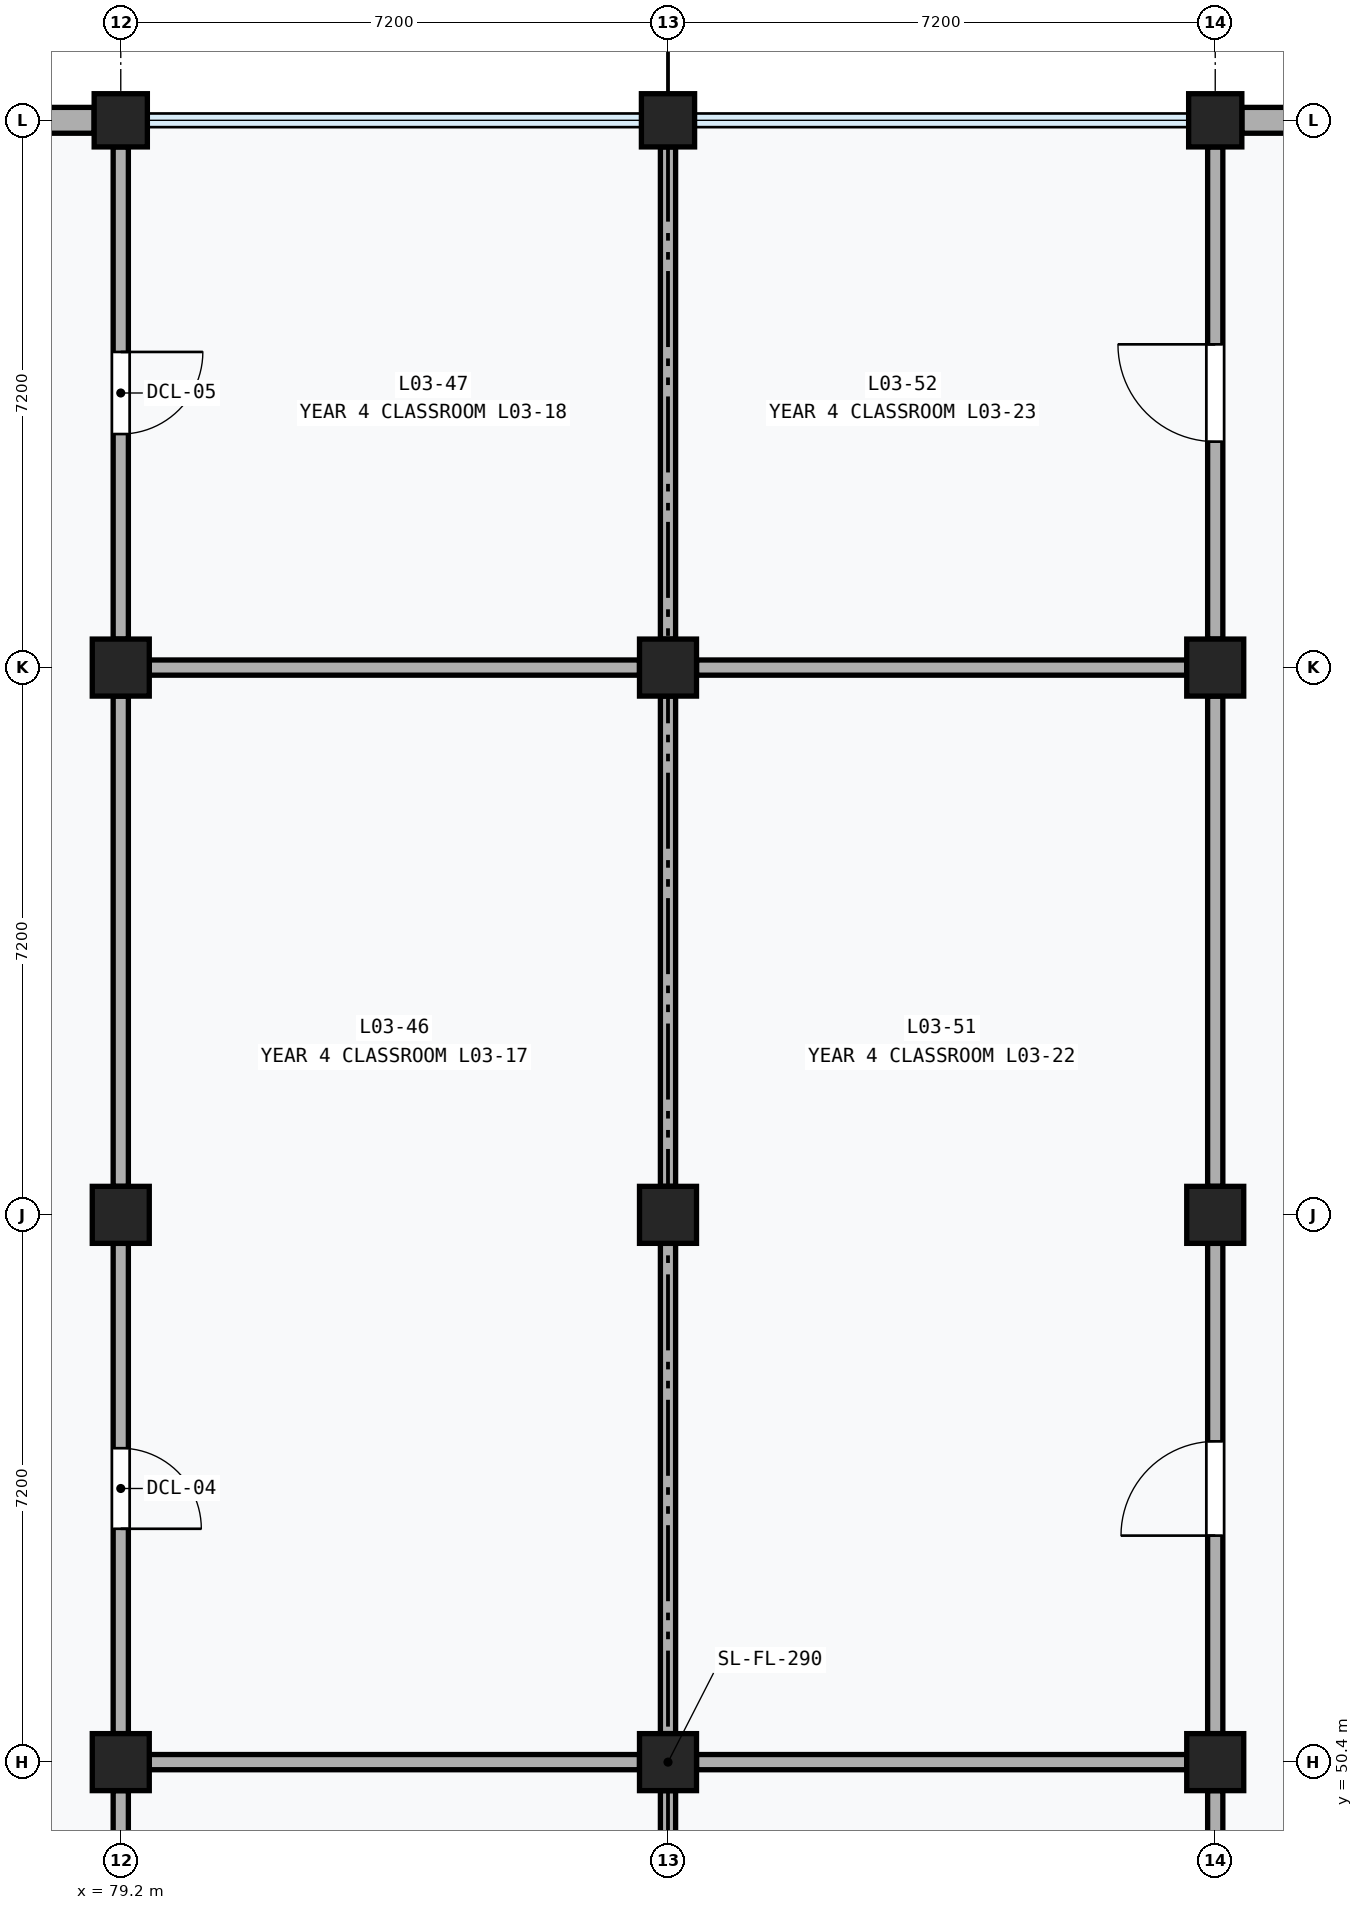
"""IFC4 building model, lengths in metres.
Left out: names, types, materials, properties, quantities, classifications, styles, units other than length and angle.
Written with IfcOpenShell. Run it as: python <this file> out.ifc"""

import sys

from ifc_helpers import new_model, si_unit, direction, frame, frame_2d, origin, origin_2d, place, context, subcontext, project, spatial, rectangle, extrude, element, fill, save


model = new_model("IFC4")
c1 = context("Model", 3, precision=1e-05, world=origin(), true_north=direction((0.0, 1.0)))
c2 = subcontext(c1, "Body", "Model", "MODEL_VIEW")
j1 = project(units=[si_unit("LENGTHUNIT", "METRE"), si_unit("PLANEANGLEUNIT", "RADIAN")], contexts=[c1])
p1 = place(None, origin())
s1 = spatial("IfcSite", under=j1, at=p1, CompositionType="ELEMENT")
p2 = place(p1, origin())
s2 = spatial("IfcBuilding", under=s1, at=p2, CompositionType="ELEMENT")
p3 = place(p2, frame((0.0, 0.0, 14.4)))
s3 = spatial("IfcBuildingStorey", under=s2, at=p3, CompositionType="ELEMENT", Elevation=14.4)
for number, where, z_axis, x_axis in (
    (1, (79.2, 50.4, 0.0), (0.0, 0.0, 1.0), (1.0, 0.0, 0.0)),
    (2, (79.2, 57.6, 0.0), (0.0, 0.0, 1.0), (1.0, 0.0, 0.0)),
    (3, (79.2, 64.8, 0.0), (0.0, 0.0, 1.0), (1.0, 0.0, 0.0)),
):
    element("IfcColumn", number, at=place(p3, frame(where, z_axis=z_axis, x_axis=x_axis)), inside=s3, PredefinedType="COLUMN", context=c2, shape_type="SweptSolid", body=[
        extrude(rectangle(XDim=0.75, YDim=0.75, at=origin_2d()), origin(), (0.0, 0.0, 1.0), 4.2),
    ])
p4 = place(p3, frame((79.2, 72.0, 0.0), z_axis=(0.0, 0.0, 1.0), x_axis=(1.0, 0.0, 0.0)))
e4 = element("IfcColumn", 4, at=p4, inside=s3, PredefinedType="COLUMN", context=c2, shape_type="SweptSolid", body=[
    extrude(rectangle(XDim=0.7, YDim=0.7, at=origin_2d()), origin(), (0.0, 0.0, 1.0), 4.2),
])
for number, where, z_axis, x_axis in (
    (5, (86.4, 50.4, 0.0), (0.0, 0.0, 1.0), (1.0, 0.0, 0.0)),
    (6, (86.4, 57.6, 0.0), (0.0, 0.0, 1.0), (1.0, 0.0, 0.0)),
    (7, (86.4, 64.8, 0.0), (0.0, 0.0, 1.0), (1.0, 0.0, 0.0)),
):
    element("IfcColumn", number, at=place(p3, frame(where, z_axis=z_axis, x_axis=x_axis)), inside=s3, PredefinedType="COLUMN", context=c2, shape_type="SweptSolid", body=[
        extrude(rectangle(XDim=0.75, YDim=0.75, at=origin_2d()), origin(), (0.0, 0.0, 1.0), 4.2),
    ])
p5 = place(p3, frame((86.4, 72.0, 0.0), z_axis=(0.0, 0.0, 1.0), x_axis=(1.0, 0.0, 0.0)))
e8 = element("IfcColumn", 8, at=p5, inside=s3, PredefinedType="COLUMN", context=c2, shape_type="SweptSolid", body=[
    extrude(rectangle(XDim=0.7, YDim=0.7, at=origin_2d()), origin(), (0.0, 0.0, 1.0), 4.2),
])
for number, where, z_axis, x_axis in (
    (9, (93.6, 50.4, 0.0), (0.0, 0.0, 1.0), (1.0, 0.0, 0.0)),
    (10, (93.6, 57.6, 0.0), (0.0, 0.0, 1.0), (1.0, 0.0, 0.0)),
    (11, (93.6, 64.8, 0.0), (0.0, 0.0, 1.0), (1.0, 0.0, 0.0)),
):
    element("IfcColumn", number, at=place(p3, frame(where, z_axis=z_axis, x_axis=x_axis)), inside=s3, PredefinedType="COLUMN", context=c2, shape_type="SweptSolid", body=[
        extrude(rectangle(XDim=0.75, YDim=0.75, at=origin_2d()), origin(), (0.0, 0.0, 1.0), 4.2),
    ])
p6 = place(p3, frame((93.6, 72.0, 0.0), z_axis=(0.0, 0.0, 1.0), x_axis=(1.0, 0.0, 0.0)))
e12 = element("IfcColumn", 12, at=p6, inside=s3, PredefinedType="COLUMN", context=c2, shape_type="SweptSolid", body=[
    extrude(rectangle(XDim=0.7, YDim=0.7, at=origin_2d()), origin(), (0.0, 0.0, 1.0), 4.2),
])
p7 = place(p3, frame((72.25, 72.0, 0.0), z_axis=(0.0, 0.0, 1.0), x_axis=(1.0, 0.0, 0.0)))
e13 = element("IfcWall", 13, at=p7, inside=s3, PredefinedType="SOLIDWALL", context=c2, shape_type="SweptSolid", body=[
    extrude(rectangle(XDim=6.6, YDim=0.34, at=frame_2d((3.3, 0.0))), origin(), (0.0, 0.0, 1.0), 3.31),
])
p8 = place(p7, frame((1.8, 0.0, 0.9)))
e14 = element("IfcOpeningElement", 14, at=p8, cuts=e13, PredefinedType="OPENING", context=c2, shape_type="SweptSolid", body=[
    extrude(rectangle(XDim=3.0, YDim=1.8, at=frame_2d((1.5, 0.9))), frame((0.0, 0.182, 0.0), z_axis=(0.0, -1.0, 0.0), x_axis=(1.0, 0.0, 0.0)), (0.0, 0.0, 1.0), 0.364),
])
p9 = place(p3, frame((93.95, 72.0, 0.0), z_axis=(0.0, 0.0, 1.0), x_axis=(1.0, 0.0, 0.0)))
e15 = element("IfcWall", 15, at=p9, inside=s3, PredefinedType="SOLIDWALL", context=c2, shape_type="SweptSolid", body=[
    extrude(rectangle(XDim=6.5, YDim=0.34, at=frame_2d((3.25, 0.0))), origin(), (0.0, 0.0, 1.0), 3.31),
])
p10 = place(p9, frame((2.35, 0.0, 0.85)))
e16 = element("IfcOpeningElement", 16, at=p10, cuts=e15, PredefinedType="OPENING", context=c2, shape_type="SweptSolid", body=[
    extrude(rectangle(XDim=1.8, YDim=2.0, at=frame_2d((0.9, 1.0))), frame((0.0, 0.182, 0.0), z_axis=(0.0, -1.0, 0.0), x_axis=(1.0, 0.0, 0.0)), (0.0, 0.0, 1.0), 0.364),
])
for number, where, z_axis, x_axis in (
    (17, (79.575, 50.4, 0.0), (0.0, 0.0, 1.0), (1.0, 0.0, 0.0)),
    (18, (79.2, 43.575, 0.0), (0.0, 0.0, 1.0), (0.0, 1.0, 0.0)),
    (19, (86.4, 43.575, 0.0), (0.0, 0.0, 1.0), (0.0, 1.0, 0.0)),
):
    element("IfcWall", number, at=place(p3, frame(where, z_axis=z_axis, x_axis=x_axis)), inside=s3, PredefinedType="PARTITIONING", context=c2, shape_type="SweptSolid", body=[
        extrude(rectangle(XDim=6.45, YDim=0.2, at=frame_2d((3.225, 0.0))), origin(), (0.0, 0.0, 1.0), 3.17),
    ])
p11 = place(p3, frame((79.2, 50.775, 0.0), z_axis=(0.0, 0.0, 1.0), x_axis=(0.0, 1.0, 0.0)))
e20 = element("IfcWall", 20, at=p11, inside=s3, PredefinedType="PARTITIONING", context=c2, shape_type="SweptSolid", body=[
    extrude(rectangle(XDim=6.45, YDim=0.2, at=frame_2d((3.225, 0.0))), origin(), (0.0, 0.0, 1.0), 3.17),
])
p12 = place(p11, frame((2.695, 0.0, 0.0)))
e21 = element("IfcOpeningElement", 21, at=p12, cuts=e20, PredefinedType="OPENING", context=c2, shape_type="SweptSolid", body=[
    extrude(rectangle(XDim=1.06, YDim=2.16, at=frame_2d((0.53, 1.08))), frame((0.0, 0.112, 0.0), z_axis=(0.0, -1.0, 0.0), x_axis=(1.0, 0.0, 0.0)), (0.0, 0.0, 1.0), 0.224),
])
p13 = place(p3, frame((86.4, 50.775, 0.0), z_axis=(0.0, 0.0, 1.0), x_axis=(0.0, 1.0, 0.0)))
e22 = element("IfcWall", 22, at=p13, inside=s3, PredefinedType="PARTITIONING", context=c2, shape_type="SweptSolid", body=[
    extrude(rectangle(XDim=6.45, YDim=0.2, at=frame_2d((3.225, 0.0))), origin(), (0.0, 0.0, 1.0), 3.17),
])
p14 = place(p3, frame((79.575, 64.8, 0.0), z_axis=(0.0, 0.0, 1.0), x_axis=(1.0, 0.0, 0.0)))
e23 = element("IfcWall", 23, at=p14, inside=s3, PredefinedType="PARTITIONING", context=c2, shape_type="SweptSolid", body=[
    extrude(rectangle(XDim=6.45, YDim=0.2, at=frame_2d((3.225, 0.0))), origin(), (0.0, 0.0, 1.0), 3.24),
])
for number, where, z_axis, x_axis in (
    (24, (79.2, 57.975, 0.0), (0.0, 0.0, 1.0), (0.0, 1.0, 0.0)),
    (25, (86.4, 57.975, 0.0), (0.0, 0.0, 1.0), (0.0, 1.0, 0.0)),
):
    element("IfcWall", number, at=place(p3, frame(where, z_axis=z_axis, x_axis=x_axis)), inside=s3, PredefinedType="PARTITIONING", context=c2, shape_type="SweptSolid", body=[
        extrude(rectangle(XDim=6.45, YDim=0.2, at=frame_2d((3.225, 0.0))), origin(), (0.0, 0.0, 1.0), 3.17),
    ])
p15 = place(p3, frame((79.2, 65.175, 0.0), z_axis=(0.0, 0.0, 1.0), x_axis=(0.0, 1.0, 0.0)))
e26 = element("IfcWall", 26, at=p15, inside=s3, PredefinedType="PARTITIONING", context=c2, shape_type="SweptSolid", body=[
    extrude(rectangle(XDim=6.475, YDim=0.2, at=frame_2d((3.237, 0.0))), origin(), (0.0, 0.0, 1.0), 3.17),
])
p16 = place(p15, frame((2.698, 0.0, 0.0)))
e27 = element("IfcOpeningElement", 27, at=p16, cuts=e26, PredefinedType="OPENING", context=c2, shape_type="SweptSolid", body=[
    extrude(rectangle(XDim=1.08, YDim=2.18, at=frame_2d((0.54, 1.09))), frame((0.0, 0.112, 0.0), z_axis=(0.0, -1.0, 0.0), x_axis=(1.0, 0.0, 0.0)), (0.0, 0.0, 1.0), 0.224),
])
p17 = place(p3, frame((86.4, 65.175, 0.0), z_axis=(0.0, 0.0, 1.0), x_axis=(0.0, 1.0, 0.0)))
e28 = element("IfcWall", 28, at=p17, inside=s3, PredefinedType="PARTITIONING", context=c2, shape_type="SweptSolid", body=[
    extrude(rectangle(XDim=6.475, YDim=0.2, at=frame_2d((3.237, 0.0))), origin(), (0.0, 0.0, 1.0), 3.17),
])
p18 = place(p3, frame((86.775, 50.4, 0.0), z_axis=(0.0, 0.0, 1.0), x_axis=(1.0, 0.0, 0.0)))
e29 = element("IfcWall", 29, at=p18, inside=s3, PredefinedType="PARTITIONING", context=c2, shape_type="SweptSolid", body=[
    extrude(rectangle(XDim=6.45, YDim=0.2, at=frame_2d((3.225, 0.0))), origin(), (0.0, 0.0, 1.0), 3.17),
])
p19 = place(p3, frame((93.6, 43.575, 0.0), z_axis=(0.0, 0.0, 1.0), x_axis=(0.0, 1.0, 0.0)))
e30 = element("IfcWall", 30, at=p19, inside=s3, PredefinedType="PARTITIONING", context=c2, shape_type="SweptSolid", body=[
    extrude(rectangle(XDim=6.45, YDim=0.2, at=frame_2d((3.225, 0.0))), origin(), (0.0, 0.0, 1.0), 3.17),
])
p20 = place(p3, frame((93.6, 50.775, 0.0), z_axis=(0.0, 0.0, 1.0), x_axis=(0.0, 1.0, 0.0)))
e31 = element("IfcWall", 31, at=p20, inside=s3, PredefinedType="PARTITIONING", context=c2, shape_type="SweptSolid", body=[
    extrude(rectangle(XDim=6.45, YDim=0.2, at=frame_2d((3.225, 0.0))), origin(), (0.0, 0.0, 1.0), 3.17),
])
p21 = place(p20, frame((2.605, 0.0, 0.0)))
e32 = element("IfcOpeningElement", 32, at=p21, cuts=e31, PredefinedType="OPENING", context=c2, shape_type="SweptSolid", body=[
    extrude(rectangle(XDim=1.24, YDim=2.26, at=frame_2d((0.62, 1.13))), frame((0.0, 0.112, 0.0), z_axis=(0.0, -1.0, 0.0), x_axis=(1.0, 0.0, 0.0)), (0.0, 0.0, 1.0), 0.224),
])
p22 = place(p3, frame((86.775, 64.8, 0.0), z_axis=(0.0, 0.0, 1.0), x_axis=(1.0, 0.0, 0.0)))
e33 = element("IfcWall", 33, at=p22, inside=s3, PredefinedType="PARTITIONING", context=c2, shape_type="SweptSolid", body=[
    extrude(rectangle(XDim=6.45, YDim=0.2, at=frame_2d((3.225, 0.0))), origin(), (0.0, 0.0, 1.0), 3.17),
])
p23 = place(p3, frame((93.6, 57.975, 0.0), z_axis=(0.0, 0.0, 1.0), x_axis=(0.0, 1.0, 0.0)))
e34 = element("IfcWall", 34, at=p23, inside=s3, PredefinedType="PARTITIONING", context=c2, shape_type="SweptSolid", body=[
    extrude(rectangle(XDim=6.45, YDim=0.2, at=frame_2d((3.225, 0.0))), origin(), (0.0, 0.0, 1.0), 3.17),
])
p24 = place(p3, frame((93.6, 65.175, 0.0), z_axis=(0.0, 0.0, 1.0), x_axis=(0.0, 1.0, 0.0)))
e35 = element("IfcWall", 35, at=p24, inside=s3, PredefinedType="PARTITIONING", context=c2, shape_type="SweptSolid", body=[
    extrude(rectangle(XDim=6.475, YDim=0.2, at=frame_2d((3.237, 0.0))), origin(), (0.0, 0.0, 1.0), 3.17),
])
p25 = place(p24, frame((2.597, 0.0, 0.0)))
e36 = element("IfcOpeningElement", 36, at=p25, cuts=e35, PredefinedType="OPENING", context=c2, shape_type="SweptSolid", body=[
    extrude(rectangle(XDim=1.28, YDim=2.28, at=frame_2d((0.64, 1.14))), frame((0.0, 0.112, 0.0), z_axis=(0.0, -1.0, 0.0), x_axis=(1.0, 0.0, 0.0)), (0.0, 0.0, 1.0), 0.224),
])
p26 = place(p12, frame((1.06, 0.0, 0.0), z_axis=(0.0, 0.0, 1.0), x_axis=(-1.0, 0.0, 0.0)))
e37 = element("IfcDoor", 37, at=p26, inside=s3, OperationType="SINGLE_SWING_RIGHT", PredefinedType="DOOR", context=c2, shape_type="SweptSolid", body=[
    extrude(rectangle(XDim=1.06, YDim=2.16, at=frame_2d((0.53, 1.08))), frame((0.0, 0.025, 0.0), z_axis=(0.0, -1.0, 0.0), x_axis=(1.0, 0.0, 0.0)), (0.0, 0.0, 1.0), 0.05),
])
fill(e21, e37)
p27 = place(p16, frame((1.08, 0.0, 0.0), z_axis=(0.0, 0.0, 1.0), x_axis=(-1.0, 0.0, 0.0)))
e38 = element("IfcDoor", 38, at=p27, inside=s3, OperationType="SINGLE_SWING_LEFT", PredefinedType="DOOR", context=c2, shape_type="SweptSolid", body=[
    extrude(rectangle(XDim=1.08, YDim=2.18, at=frame_2d((0.54, 1.09))), frame((0.0, 0.025, 0.0), z_axis=(0.0, -1.0, 0.0), x_axis=(1.0, 0.0, 0.0)), (0.0, 0.0, 1.0), 0.05),
])
fill(e27, e38)
p28 = place(p21, origin())
e39 = element("IfcDoor", 39, at=p28, inside=s3, OperationType="SINGLE_SWING_LEFT", PredefinedType="DOOR", context=c2, shape_type="SweptSolid", body=[
    extrude(rectangle(XDim=1.24, YDim=2.26, at=frame_2d((0.62, 1.13))), frame((0.0, 0.025, 0.0), z_axis=(0.0, -1.0, 0.0), x_axis=(1.0, 0.0, 0.0)), (0.0, 0.0, 1.0), 0.05),
])
fill(e32, e39)
p29 = place(p25, origin())
e40 = element("IfcDoor", 40, at=p29, inside=s3, OperationType="SINGLE_SWING_RIGHT", PredefinedType="DOOR", context=c2, shape_type="SweptSolid", body=[
    extrude(rectangle(XDim=1.28, YDim=2.28, at=frame_2d((0.64, 1.14))), frame((0.0, 0.025, 0.0), z_axis=(0.0, -1.0, 0.0), x_axis=(1.0, 0.0, 0.0)), (0.0, 0.0, 1.0), 0.05),
])
fill(e36, e40)
save(model, sys.argv[1])
